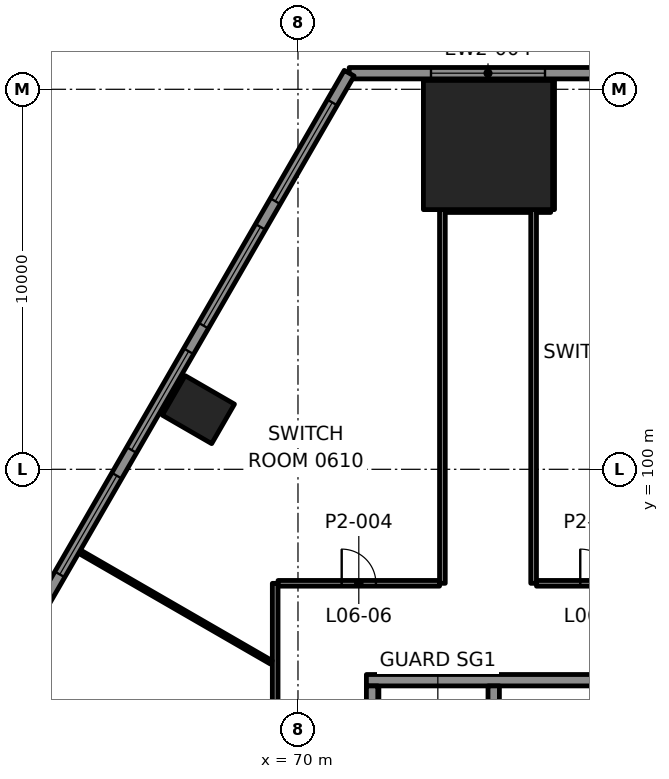
"""IFC4 building model, lengths in metres.
Left out: names, types, materials, properties, quantities, classifications, styles, units other than length and angle.
Written with IfcOpenShell. Run it as: python <this file> out.ifc"""

import sys

from ifc_helpers import new_model, si_unit, direction, frame, frame_2d, origin, origin_2d, place, context, subcontext, project, spatial, rectangle, extrude, element, fill, save


model = new_model("IFC4")
c1 = context("Model", 3, precision=1e-05, world=origin(), true_north=direction((0.0, 1.0)))
c2 = subcontext(c1, "Body", "Model", "MODEL_VIEW")
j1 = project(units=[si_unit("LENGTHUNIT", "METRE"), si_unit("PLANEANGLEUNIT", "RADIAN")], contexts=[c1])
p1 = place(None, origin())
s1 = spatial("IfcSite", under=j1, at=p1, CompositionType="ELEMENT")
p2 = place(p1, origin())
s2 = spatial("IfcBuilding", under=s1, at=p2, CompositionType="ELEMENT")
p3 = place(p2, frame((0.0, 0.0, 31.0)))
s3 = spatial("IfcBuildingStorey", under=s2, at=p3, CompositionType="ELEMENT", Elevation=31.0)
p4 = place(p3, frame((75.0, 108.534, 0.0), z_axis=(0.0, 0.0, 1.0), x_axis=(-1.0, 0.0, 0.0)))
e1 = element("IfcColumn", 1, at=p4, inside=s3, PredefinedType="COLUMN", context=c2, shape_type="SweptSolid", body=[
    extrude(rectangle(XDim=3.4, YDim=3.4, at=origin_2d()), origin(), (0.0, 0.0, 1.0), 4.5),
])
for number, where, z_axis, x_axis in (
    (2, (67.379, 101.57, -0.0), (0.0, 0.0, 1.0), (-0.5, -0.866, 0.0)),
    (3, (62.579, 93.256, -0.0), (0.0, 0.0, 1.0), (-0.5, -0.866, 0.0)),
):
    element("IfcColumn", number, at=place(p3, frame(where, z_axis=z_axis, x_axis=x_axis)), inside=s3, PredefinedType="COLUMN", context=c2, shape_type="SweptSolid", body=[
        extrude(rectangle(XDim=1.2, YDim=1.5, at=origin_2d()), origin(), (0.0, 0.0, 1.0), 4.5),
    ])
p5 = place(p3, frame((71.8, 94.45, 0.0), z_axis=(0.0, 0.0, 1.0), x_axis=(1.0, 0.0, 0.0)))
e4 = element("IfcWall", 4, at=p5, inside=s3, PredefinedType="SHEAR", context=c2, shape_type="SweptSolid", body=[
    extrude(rectangle(XDim=6.4, YDim=0.3, at=frame_2d((3.2, 0.0))), origin(), (0.0, 0.0, 1.0), 4.05),
])
p6 = place(p3, frame((71.95, 88.1, 0.0), z_axis=(0.0, 0.0, 1.0), x_axis=(0.0, 1.0, 0.0)))
e5 = element("IfcWall", 5, at=p6, inside=s3, PredefinedType="SHEAR", context=c2, shape_type="SweptSolid", body=[
    extrude(rectangle(XDim=6.2, YDim=0.3, at=frame_2d((3.1, 0.0))), origin(), (0.0, 0.0, 1.0), 4.05),
])
p7 = place(p3, frame((75.15, 88.1, 0.0), z_axis=(0.0, 0.0, 1.0), x_axis=(0.0, 1.0, 0.0)))
e6 = element("IfcWall", 6, at=p7, inside=s3, PredefinedType="SHEAR", context=c2, shape_type="SweptSolid", body=[
    extrude(rectangle(XDim=6.2, YDim=0.3, at=frame_2d((3.1, 0.0))), origin(), (0.0, 0.0, 1.0), 4.05),
])
p8 = place(p7, frame((0.185, 0.0, 0.0)))
e7 = element("IfcOpeningElement", 7, at=p8, cuts=e6, PredefinedType="OPENING", context=c2, shape_type="SweptSolid", body=[
    extrude(rectangle(XDim=1.0, YDim=2.1, at=frame_2d((0.5, 1.05))), frame((0.0, 0.16, 0.0), z_axis=(0.0, -1.0, 0.0), x_axis=(1.0, 0.0, 0.0)), (0.0, 0.0, 1.0), 0.32),
])
p9 = place(p3, frame((69.476, 97.0, 0.0), z_axis=(0.0, 0.0, 1.0), x_axis=(1.0, 0.0, 0.0)))
e8 = element("IfcWall", 8, at=p9, inside=s3, PredefinedType="PARTITIONING", context=c2, shape_type="SweptSolid", body=[
    extrude(rectangle(XDim=4.25, YDim=0.15, at=frame_2d((2.125, 0.0))), origin(), (0.0, 0.0, 1.0), 3.45),
])
p10 = place(p9, frame((1.675, 0.0, 0.0)))
e9 = element("IfcOpeningElement", 9, at=p10, cuts=e8, PredefinedType="OPENING", context=c2, shape_type="SweptSolid", body=[
    extrude(rectangle(XDim=0.9, YDim=2.1, at=frame_2d((0.45, 1.05))), frame((0.0, 0.085, 0.0), z_axis=(0.0, -1.0, 0.0), x_axis=(1.0, 0.0, 0.0)), (0.0, 0.0, 1.0), 0.17),
])
p11 = place(p3, frame((76.275, 97.0, 0.0), z_axis=(0.0, 0.0, 1.0), x_axis=(1.0, 0.0, 0.0)))
e10 = element("IfcWall", 10, at=p11, inside=s3, PredefinedType="PARTITIONING", context=c2, shape_type="SweptSolid", body=[
    extrude(rectangle(XDim=3.205, YDim=0.15, at=frame_2d((1.603, 0.0))), origin(), (0.0, 0.0, 1.0), 3.45),
])
p12 = place(p11, frame((1.153, 0.0, 0.0)))
e11 = element("IfcOpeningElement", 11, at=p12, cuts=e10, PredefinedType="OPENING", context=c2, shape_type="SweptSolid", body=[
    extrude(rectangle(XDim=0.9, YDim=2.1, at=frame_2d((0.45, 1.05))), frame((0.0, 0.085, 0.0), z_axis=(0.0, -1.0, 0.0), x_axis=(1.0, 0.0, 0.0)), (0.0, 0.0, 1.0), 0.17),
])
p13 = place(p3, frame((73.875, 106.834, 0.0), z_axis=(0.0, 0.0, 1.0), x_axis=(1.0, 0.0, 0.0)))
e12 = element("IfcWall", 12, at=p13, inside=s3, PredefinedType="PARTITIONING", context=c2, shape_type="SweptSolid", body=[
    extrude(rectangle(XDim=2.25, YDim=0.15, at=frame_2d((1.125, 0.0))), origin(), (0.0, 0.0, 1.0), 3.447),
])
p14 = place(p3, frame((76.7, 106.834, 0.0), z_axis=(0.0, 0.0, 1.0), x_axis=(0.0, 1.0, 0.0)))
e13 = element("IfcWall", 13, at=p14, inside=s3, PredefinedType="PARTITIONING", context=c2, shape_type="SweptSolid", body=[
    extrude(rectangle(XDim=3.56, YDim=0.1, at=frame_2d((1.78, 0.0))), origin(), (0.0, 0.0, 1.0), 3.45),
])
p15 = place(p3, frame((76.2, 97.0, 0.0), z_axis=(0.0, 0.0, 1.0), x_axis=(0.0, 1.0, 0.0)))
e14 = element("IfcWall", 14, at=p15, inside=s3, PredefinedType="PARTITIONING", context=c2, shape_type="SweptSolid", body=[
    extrude(rectangle(XDim=9.834, YDim=0.15, at=frame_2d((4.917, 0.0))), origin(), (0.0, 0.0, 1.0), 3.45),
])
p16 = place(p3, frame((73.8, 97.0, 0.0), z_axis=(0.0, 0.0, 1.0), x_axis=(0.0, 1.0, 0.0)))
e15 = element("IfcWall", 15, at=p16, inside=s3, PredefinedType="PARTITIONING", context=c2, shape_type="SweptSolid", body=[
    extrude(rectangle(XDim=9.833, YDim=0.15, at=frame_2d((4.917, 0.0))), origin(), (0.0, 0.0, 1.0), 3.45),
])
p17 = place(p3, frame((69.4, 86.4, 0.0), z_axis=(0.0, 0.0, 1.0), x_axis=(0.0, 1.0, 0.0)))
e16 = element("IfcWall", 16, at=p17, inside=s3, PredefinedType="PARTITIONING", context=c2, shape_type="SweptSolid", body=[
    extrude(rectangle(XDim=10.6, YDim=0.15, at=frame_2d((5.3, 0.0))), origin(), (0.0, 0.0, 1.0), 3.45),
])
p18 = place(p3, frame((69.299, 94.919, 0.0), z_axis=(0.0, 0.0, 1.0), x_axis=(-0.866023528471, 0.500003248124, 0.0)))
e17 = element("IfcWall", 17, at=p18, inside=s3, PredefinedType="PARTITIONING", context=c2, shape_type="SweptSolid", body=[
    extrude(rectangle(XDim=5.946, YDim=0.1, at=frame_2d((2.973, 0.0))), origin(), (0.0, 0.0, 1.0), 3.215),
])
p19 = place(p3, frame((76.275, 106.834, 0.0), z_axis=(0.0, 0.0, 1.0), x_axis=(1.0, 0.0, 0.0)))
e18 = element("IfcWall", 18, at=p19, inside=s3, PredefinedType="PARTITIONING", context=c2, shape_type="SweptSolid", body=[
    extrude(rectangle(XDim=0.375, YDim=0.15, at=frame_2d((0.187, 0.0))), origin(), (0.0, 0.0, 1.0), 3.45),
])
p20 = place(p3, frame((78.652, 110.424, 0.0), z_axis=(0.0, 0.0, 1.0), x_axis=(-1.0, 0.0, 0.0)))
e19 = element("IfcWall", 19, at=p20, inside=s3, PredefinedType="SOLIDWALL", context=c2, shape_type="SweptSolid", body=[
    extrude(rectangle(XDim=7.304, YDim=0.3, at=frame_2d((3.652, 0.0))), origin(), (0.0, 0.0, 1.0), 4.05),
])
p21 = place(p20, frame((2.152, 0.0, 0.8)))
e20 = element("IfcOpeningElement", 20, at=p21, cuts=e19, PredefinedType="OPENING", context=c2, shape_type="SweptSolid", body=[
    extrude(rectangle(XDim=3.0, YDim=2.4, at=frame_2d((1.5, 1.2))), frame((0.0, 0.16, 0.0), z_axis=(0.0, -1.0, 0.0), x_axis=(1.0, 0.0, 0.0)), (0.0, 0.0, 1.0), 0.32),
])
p22 = place(p3, frame((71.348, 110.424, 0.0), z_axis=(0.0, 0.0, 1.0), x_axis=(-0.500000550228, -0.86602508611, 0.0)))
e21 = element("IfcWall", 21, at=p22, inside=s3, PredefinedType="SOLIDWALL", context=c2, shape_type="SweptSolid", body=[
    extrude(rectangle(XDim=57.704, YDim=0.3, at=frame_2d((28.852, 0.0))), origin(), (0.0, 0.0, 1.0), 4.05),
])
p23 = place(p22, frame((0.89, 0.0, 0.8)))
e22 = element("IfcOpeningElement", 22, at=p23, cuts=e21, PredefinedType="OPENING", context=c2, shape_type="SweptSolid", body=[
    extrude(rectangle(XDim=3.0, YDim=2.4, at=frame_2d((1.5, 1.2))), frame((0.0, 0.16, 0.0), z_axis=(0.0, -1.0, 0.0), x_axis=(1.0, 0.0, 0.0)), (0.0, 0.0, 1.0), 0.32),
])
p24 = place(p22, frame((4.67, 0.0, 0.8)))
e23 = element("IfcOpeningElement", 23, at=p24, cuts=e21, PredefinedType="OPENING", context=c2, shape_type="SweptSolid", body=[
    extrude(rectangle(XDim=3.0, YDim=2.4, at=frame_2d((1.5, 1.2))), frame((0.0, 0.16, 0.0), z_axis=(0.0, -1.0, 0.0), x_axis=(1.0, 0.0, 0.0)), (0.0, 0.0, 1.0), 0.32),
])
p25 = place(p22, frame((8.451, 0.0, 0.8)))
e24 = element("IfcOpeningElement", 24, at=p25, cuts=e21, PredefinedType="OPENING", context=c2, shape_type="SweptSolid", body=[
    extrude(rectangle(XDim=3.0, YDim=2.4, at=frame_2d((1.5, 1.2))), frame((0.0, 0.16, 0.0), z_axis=(0.0, -1.0, 0.0), x_axis=(1.0, 0.0, 0.0)), (0.0, 0.0, 1.0), 0.32),
])
p26 = place(p22, frame((12.231, 0.0, 0.8)))
e25 = element("IfcOpeningElement", 25, at=p26, cuts=e21, PredefinedType="OPENING", context=c2, shape_type="SweptSolid", body=[
    extrude(rectangle(XDim=3.0, YDim=2.4, at=frame_2d((1.5, 1.2))), frame((0.0, 0.16, 0.0), z_axis=(0.0, -1.0, 0.0), x_axis=(1.0, 0.0, 0.0)), (0.0, 0.0, 1.0), 0.32),
])
p27 = place(p22, frame((16.011, 0.0, 0.8)))
e26 = element("IfcOpeningElement", 26, at=p27, cuts=e21, PredefinedType="OPENING", context=c2, shape_type="SweptSolid", body=[
    extrude(rectangle(XDim=3.0, YDim=2.4, at=frame_2d((1.5, 1.2))), frame((0.0, 0.16, 0.0), z_axis=(0.0, -1.0, 0.0), x_axis=(1.0, 0.0, 0.0)), (0.0, 0.0, 1.0), 0.32),
])
p28 = place(p22, frame((19.792, 0.0, 0.8)))
e27 = element("IfcOpeningElement", 27, at=p28, cuts=e21, PredefinedType="OPENING", context=c2, shape_type="SweptSolid", body=[
    extrude(rectangle(XDim=3.0, YDim=2.4, at=frame_2d((1.5, 1.2))), frame((0.0, 0.16, 0.0), z_axis=(0.0, -1.0, 0.0), x_axis=(1.0, 0.0, 0.0)), (0.0, 0.0, 1.0), 0.32),
])
p29 = place(p22, frame((23.572, 0.0, 0.8)))
e28 = element("IfcOpeningElement", 28, at=p29, cuts=e21, PredefinedType="OPENING", context=c2, shape_type="SweptSolid", body=[
    extrude(rectangle(XDim=3.0, YDim=2.4, at=frame_2d((1.5, 1.2))), frame((0.0, 0.16, 0.0), z_axis=(0.0, -1.0, 0.0), x_axis=(1.0, 0.0, 0.0)), (0.0, 0.0, 1.0), 0.32),
])
p30 = place(p22, frame((27.352, 0.0, 0.8)))
e29 = element("IfcOpeningElement", 29, at=p30, cuts=e21, PredefinedType="OPENING", context=c2, shape_type="SweptSolid", body=[
    extrude(rectangle(XDim=3.0, YDim=2.4, at=frame_2d((1.5, 1.2))), frame((0.0, 0.16, 0.0), z_axis=(0.0, -1.0, 0.0), x_axis=(1.0, 0.0, 0.0)), (0.0, 0.0, 1.0), 0.32),
])
p31 = place(p22, frame((31.132, 0.0, 0.8)))
e30 = element("IfcOpeningElement", 30, at=p31, cuts=e21, PredefinedType="OPENING", context=c2, shape_type="SweptSolid", body=[
    extrude(rectangle(XDim=3.0, YDim=2.4, at=frame_2d((1.5, 1.2))), frame((0.0, 0.16, 0.0), z_axis=(0.0, -1.0, 0.0), x_axis=(1.0, 0.0, 0.0)), (0.0, 0.0, 1.0), 0.32),
])
p32 = place(p22, frame((34.913, 0.0, 0.8)))
e31 = element("IfcOpeningElement", 31, at=p32, cuts=e21, PredefinedType="OPENING", context=c2, shape_type="SweptSolid", body=[
    extrude(rectangle(XDim=3.0, YDim=2.4, at=frame_2d((1.5, 1.2))), frame((0.0, 0.16, 0.0), z_axis=(0.0, -1.0, 0.0), x_axis=(1.0, 0.0, 0.0)), (0.0, 0.0, 1.0), 0.32),
])
p33 = place(p22, frame((38.693, 0.0, 0.8)))
e32 = element("IfcOpeningElement", 32, at=p33, cuts=e21, PredefinedType="OPENING", context=c2, shape_type="SweptSolid", body=[
    extrude(rectangle(XDim=3.0, YDim=2.4, at=frame_2d((1.5, 1.2))), frame((0.0, 0.16, 0.0), z_axis=(0.0, -1.0, 0.0), x_axis=(1.0, 0.0, 0.0)), (0.0, 0.0, 1.0), 0.32),
])
p34 = place(p22, frame((42.473, 0.0, 0.8)))
e33 = element("IfcOpeningElement", 33, at=p34, cuts=e21, PredefinedType="OPENING", context=c2, shape_type="SweptSolid", body=[
    extrude(rectangle(XDim=3.0, YDim=2.4, at=frame_2d((1.5, 1.2))), frame((0.0, 0.16, 0.0), z_axis=(0.0, -1.0, 0.0), x_axis=(1.0, 0.0, 0.0)), (0.0, 0.0, 1.0), 0.32),
])
p35 = place(p22, frame((46.253, 0.0, 0.8)))
e34 = element("IfcOpeningElement", 34, at=p35, cuts=e21, PredefinedType="OPENING", context=c2, shape_type="SweptSolid", body=[
    extrude(rectangle(XDim=3.0, YDim=2.4, at=frame_2d((1.5, 1.2))), frame((0.0, 0.16, 0.0), z_axis=(0.0, -1.0, 0.0), x_axis=(1.0, 0.0, 0.0)), (0.0, 0.0, 1.0), 0.32),
])
p36 = place(p22, frame((50.033, 0.0, 0.8)))
e35 = element("IfcOpeningElement", 35, at=p36, cuts=e21, PredefinedType="OPENING", context=c2, shape_type="SweptSolid", body=[
    extrude(rectangle(XDim=3.0, YDim=2.4, at=frame_2d((1.5, 1.2))), frame((0.0, 0.16, 0.0), z_axis=(0.0, -1.0, 0.0), x_axis=(1.0, 0.0, 0.0)), (0.0, 0.0, 1.0), 0.32),
])
p37 = place(p22, frame((53.814, 0.0, 0.8)))
e36 = element("IfcOpeningElement", 36, at=p37, cuts=e21, PredefinedType="OPENING", context=c2, shape_type="SweptSolid", body=[
    extrude(rectangle(XDim=3.0, YDim=2.4, at=frame_2d((1.5, 1.2))), frame((0.0, 0.16, 0.0), z_axis=(0.0, -1.0, 0.0), x_axis=(1.0, 0.0, 0.0)), (0.0, 0.0, 1.0), 0.32),
])
p38 = place(p10, origin())
e37 = element("IfcDoor", 37, at=p38, inside=s3, OperationType="SINGLE_SWING_LEFT", PredefinedType="DOOR", context=c2, shape_type="SweptSolid", body=[
    extrude(rectangle(XDim=0.9, YDim=2.1, at=frame_2d((0.45, 1.05))), frame((0.0, 0.025, 0.0), z_axis=(0.0, -1.0, 0.0), x_axis=(1.0, 0.0, 0.0)), (0.0, 0.0, 1.0), 0.05),
])
fill(e9, e37)
p39 = place(p12, origin())
e38 = element("IfcDoor", 38, at=p39, inside=s3, OperationType="SINGLE_SWING_RIGHT", PredefinedType="DOOR", context=c2, shape_type="SweptSolid", body=[
    extrude(rectangle(XDim=0.9, YDim=2.1, at=frame_2d((0.45, 1.05))), frame((0.0, 0.025, 0.0), z_axis=(0.0, -1.0, 0.0), x_axis=(1.0, 0.0, 0.0)), (0.0, 0.0, 1.0), 0.05),
])
fill(e11, e38)
p40 = place(p21, origin())
e39 = element("IfcWindow", 39, at=p40, inside=s3, PartitioningType="SINGLE_PANEL", PredefinedType="WINDOW", context=c2, shape_type="SweptSolid", body=[
    extrude(rectangle(XDim=3.0, YDim=2.4, at=frame_2d((1.5, 1.2))), frame((0.0, 0.03, 0.0), z_axis=(0.0, -1.0, 0.0), x_axis=(1.0, 0.0, 0.0)), (0.0, 0.0, 1.0), 0.06),
])
fill(e20, e39)
p41 = place(p23, origin())
e40 = element("IfcWindow", 40, at=p41, inside=s3, PartitioningType="SINGLE_PANEL", PredefinedType="WINDOW", context=c2, shape_type="SweptSolid", body=[
    extrude(rectangle(XDim=3.0, YDim=2.4, at=frame_2d((1.5, 1.2))), frame((0.0, 0.03, 0.0), z_axis=(0.0, -1.0, 0.0), x_axis=(1.0, 0.0, 0.0)), (0.0, 0.0, 1.0), 0.06),
])
fill(e22, e40)
p42 = place(p24, origin())
e41 = element("IfcWindow", 41, at=p42, inside=s3, PartitioningType="SINGLE_PANEL", PredefinedType="WINDOW", context=c2, shape_type="SweptSolid", body=[
    extrude(rectangle(XDim=3.0, YDim=2.4, at=frame_2d((1.5, 1.2))), frame((0.0, 0.03, 0.0), z_axis=(0.0, -1.0, 0.0), x_axis=(1.0, 0.0, 0.0)), (0.0, 0.0, 1.0), 0.06),
])
fill(e23, e41)
p43 = place(p25, origin())
e42 = element("IfcWindow", 42, at=p43, inside=s3, PartitioningType="SINGLE_PANEL", PredefinedType="WINDOW", context=c2, shape_type="SweptSolid", body=[
    extrude(rectangle(XDim=3.0, YDim=2.4, at=frame_2d((1.5, 1.2))), frame((0.0, 0.03, 0.0), z_axis=(0.0, -1.0, 0.0), x_axis=(1.0, 0.0, 0.0)), (0.0, 0.0, 1.0), 0.06),
])
fill(e24, e42)
p44 = place(p26, origin())
e43 = element("IfcWindow", 43, at=p44, inside=s3, PartitioningType="SINGLE_PANEL", PredefinedType="WINDOW", context=c2, shape_type="SweptSolid", body=[
    extrude(rectangle(XDim=3.0, YDim=2.4, at=frame_2d((1.5, 1.2))), frame((0.0, 0.03, 0.0), z_axis=(0.0, -1.0, 0.0), x_axis=(1.0, 0.0, 0.0)), (0.0, 0.0, 1.0), 0.06),
])
fill(e25, e43)
save(model, sys.argv[1])
